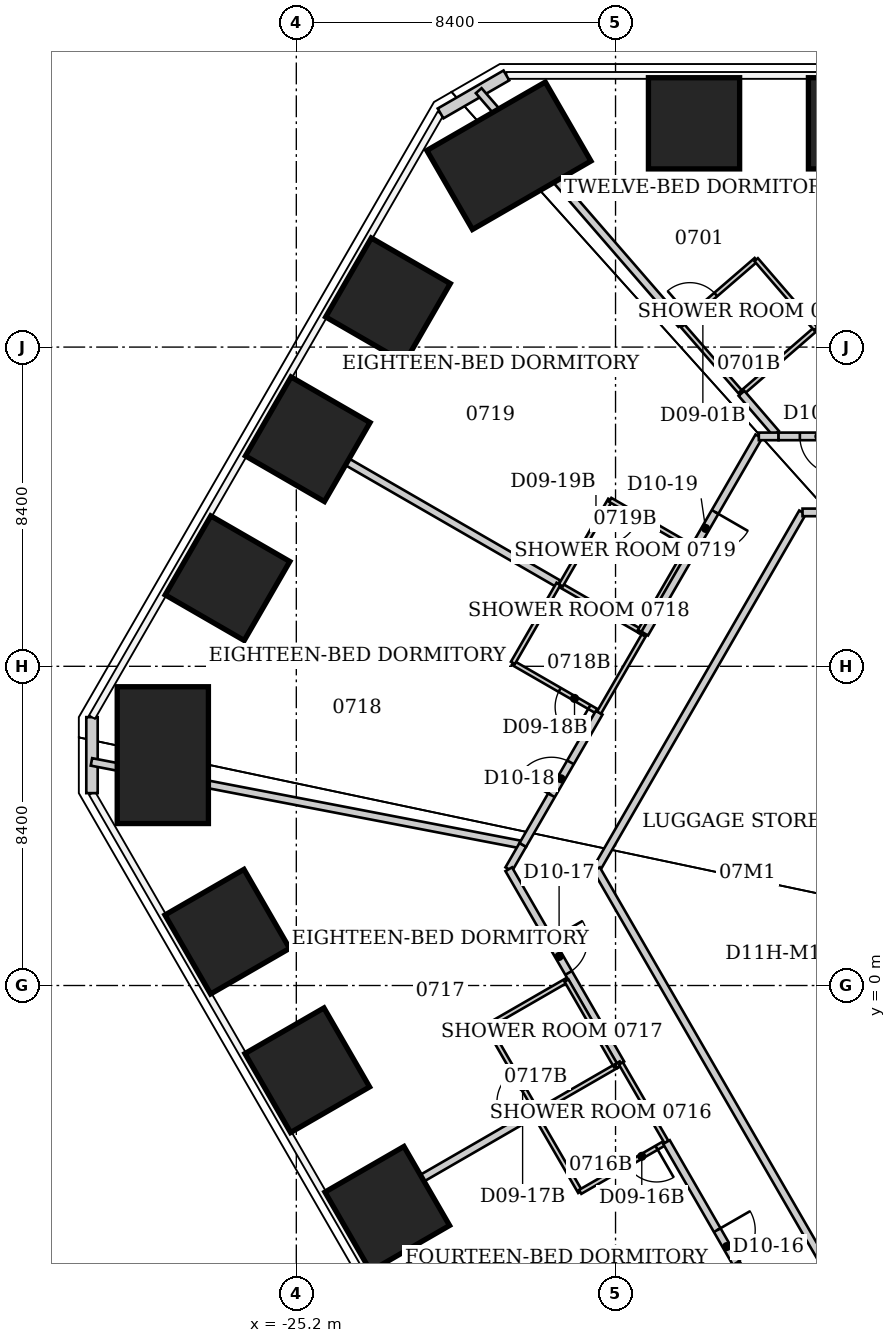
"""IFC4 building model, lengths in metres.
Left out: names, types, materials, properties, quantities, classifications, styles, units other than length and angle.
Written with IfcOpenShell. Run it as: python <this file> out.ifc"""

import sys

from ifc_helpers import new_model, si_unit, direction, frame, frame_2d, origin, origin_2d, place, context, subcontext, project, spatial, rectangle, extrude, element, fill, save


model = new_model("IFC4")
c1 = context("Model", 3, precision=1e-05, world=origin(), true_north=direction((0.0, 1.0)))
c2 = subcontext(c1, "Body", "Model", "MODEL_VIEW")
j1 = project(units=[si_unit("LENGTHUNIT", "METRE"), si_unit("PLANEANGLEUNIT", "RADIAN")], contexts=[c1])
p1 = place(None, origin())
s1 = spatial("IfcSite", under=j1, at=p1, CompositionType="ELEMENT")
p2 = place(p1, origin())
s2 = spatial("IfcBuilding", under=s1, at=p2, CompositionType="ELEMENT")
p3 = place(p2, frame((0.0, 0.0, 34.4)))
s3 = spatial("IfcBuildingStorey", under=s2, at=p3, CompositionType="ELEMENT", Elevation=34.4)
for number, where, z_axis, x_axis in (
    (1, (-14.735, 22.689, 0.0), (0.0, 0.0, 1.0), (0.0, 1.0, 0.0)),
    (2, (-10.525, 22.689, 0.0), (0.0, 0.0, 1.0), (0.0, 1.0, 0.0)),
    (3, (-22.806, -5.875, 0.0), (0.0, 0.0, 1.0), (-0.866, -0.5, 0.0)),
    (4, (-24.911, -2.23, 0.0), (0.0, 0.0, 1.0), (-0.866, -0.5, 0.0)),
    (5, (-27.016, 1.416, 0.0), (0.0, 0.0, 1.0), (-0.866, -0.5, 0.0)),
):
    element("IfcColumn", number, at=place(p3, frame(where, z_axis=z_axis, x_axis=x_axis)), inside=s3, PredefinedType="COLUMN", context=c2, shape_type="SweptSolid", body=[
        extrude(rectangle(XDim=2.4, YDim=2.4, at=origin_2d()), origin(), (0.0, 0.0, 1.0), 3.8),
    ])
p4 = place(p3, frame((-28.713, 6.062, 0.0), z_axis=(0.0, 0.0, 1.0), x_axis=(-1.0, 0.0, 0.0)))
e6 = element("IfcColumn", 6, at=p4, inside=s3, PredefinedType="COLUMN", context=c2, shape_type="SweptSolid", body=[
    extrude(rectangle(XDim=2.4, YDim=3.6, at=origin_2d()), origin(), (0.0, 0.0, 1.0), 3.8),
])
for number, where, z_axis, x_axis in (
    (7, (-27.01, 10.719, 0.0), (0.0, 0.0, 1.0), (-0.866, 0.5, 0.0)),
    (8, (-24.899, 14.375, 0.0), (0.0, 0.0, 1.0), (-0.866, 0.5, 0.0)),
    (9, (-22.788, 18.032, 0.0), (0.0, 0.0, 1.0), (-0.866, 0.5, 0.0)),
):
    element("IfcColumn", number, at=place(p3, frame(where, z_axis=z_axis, x_axis=x_axis)), inside=s3, PredefinedType="COLUMN", context=c2, shape_type="SweptSolid", body=[
        extrude(rectangle(XDim=2.4, YDim=2.4, at=origin_2d()), origin(), (0.0, 0.0, 1.0), 3.8),
    ])
p5 = place(p3, frame((-19.606, 21.835, 0.0), z_axis=(0.0, 0.0, 1.0), x_axis=(-0.5, 0.866025403784, 0.0)))
e10 = element("IfcColumn", 10, at=p5, inside=s3, PredefinedType="COLUMN", context=c2, shape_type="SweptSolid", body=[
    extrude(rectangle(XDim=2.4, YDim=3.6, at=origin_2d()), origin(), (0.0, 0.0, 1.0), 3.8),
])
for number, where, z_axis, x_axis in (
    (11, (-30.576, 5.062, 0.0), (0.0, 0.0, 1.0), (0.0, 1.0, 0.0)),
    (12, (-21.404, 22.949, 0.0), (0.0, 0.0, 1.0), (0.866, 0.5, 0.0)),
):
    element("IfcWall", number, at=place(p3, frame(where, z_axis=z_axis, x_axis=x_axis)), inside=s3, PredefinedType="SOLIDWALL", context=c2, shape_type="SweptSolid", body=[
        extrude(rectangle(XDim=2.0, YDim=0.3, at=frame_2d((1.0, 0.0))), origin(), (0.0, 0.0, 1.0), 3.64),
    ])
p6 = place(p3, frame((-30.591, 5.884, 0.0), z_axis=(0.0, 0.0, 1.0), x_axis=(0.981983289605, -0.188967772219, 0.0)))
e13 = element("IfcWall", 13, at=p6, inside=s3, PredefinedType="PARTITIONING", context=c2, shape_type="SweptSolid", body=[
    extrude(rectangle(XDim=11.509, YDim=0.2, at=frame_2d((5.754, 0.0))), origin(), (0.0, 0.0, 1.0), 3.64),
])
p7 = place(p3, frame((-25.886, 14.95, 0.0), z_axis=(0.0, 0.0, 1.0), x_axis=(0.866018495177, -0.500011965869, 0.0)))
e14 = element("IfcWall", 14, at=p7, inside=s3, PredefinedType="PARTITIONING", context=c2, shape_type="SweptSolid", body=[
    extrude(rectangle(XDim=8.76, YDim=0.2, at=frame_2d((4.38, 0.0))), origin(), (0.0, 0.0, 1.0), 2.86),
])
p8 = place(p3, frame((-23.916, -6.24, 0.0), z_axis=(0.0, 0.0, 1.0), x_axis=(0.865919350456, 0.50018364478, 0.0)))
e15 = element("IfcWall", 15, at=p8, inside=s3, PredefinedType="PARTITIONING", context=c2, shape_type="SweptSolid", body=[
    extrude(rectangle(XDim=5.758, YDim=0.2, at=frame_2d((2.879, 0.0))), origin(), (0.0, 0.0, 1.0), 3.64),
])
p9 = place(p3, frame((-20.4, 23.547, 0.0), z_axis=(0.0, 0.0, 1.0), x_axis=(0.655107582677, -0.755535608108, 0.0)))
e16 = element("IfcWall", 16, at=p9, inside=s3, PredefinedType="PARTITIONING", context=c2, shape_type="SweptSolid", body=[
    extrude(rectangle(XDim=8.136, YDim=0.2, at=frame_2d((4.068, 0.0))), origin(), (0.0, 0.0, 1.0), 3.64),
])
p10 = place(p3, frame((-20.17, -1.07, 0.0), z_axis=(0.0, 0.0, 1.0), x_axis=(0.500291685314, -0.865856933682, 0.0)))
e17 = element("IfcWall", 17, at=p10, inside=s3, PredefinedType="PARTITIONING", context=c2, shape_type="SweptSolid", body=[
    extrude(rectangle(XDim=2.599, YDim=0.12, at=frame_2d((1.299, 0.0))), origin(), (0.0, 0.0, 1.0), 3.64),
])
p11 = place(p10, frame((1.399, 0.0, 0.0)))
e18 = element("IfcOpeningElement", 18, at=p11, cuts=e17, PredefinedType="OPENING", context=c2, shape_type="SweptSolid", body=[
    extrude(rectangle(XDim=0.9, YDim=2.03, at=frame_2d((0.45, 1.015))), frame((0.0, 0.06, 0.0), z_axis=(0.0, -1.0, 0.0), x_axis=(1.0, 0.0, 0.0)), (0.0, 0.0, 1.0), 0.12),
])
p12 = place(p3, frame((-19.61, 3.06, 0.0), z_axis=(0.0, 0.0, 1.0), x_axis=(0.50068472101, 0.865629718844, 0.0)))
e19 = element("IfcWall", 19, at=p12, inside=s3, PredefinedType="PARTITIONING", context=c2, shape_type="SweptSolid", body=[
    extrude(rectangle(XDim=0.739, YDim=0.2, at=frame_2d((0.37, 0.0))), origin(), (0.0, 0.0, 1.0), 3.64),
])
p13 = place(p3, frame((-19.61, 3.06, 0.0), z_axis=(0.0, 0.0, 1.0), x_axis=(0.499983910424, -0.866034692906, 0.0)))
e20 = element("IfcWall", 20, at=p13, inside=s3, PredefinedType="PARTITIONING", context=c2, shape_type="SweptSolid", body=[
    extrude(rectangle(XDim=5.901, YDim=0.2, at=frame_2d((2.95, 0.0))), origin(), (0.0, 0.0, 1.0), 3.64),
])
p14 = place(p13, frame((2.15, 0.0, 0.0)))
e21 = element("IfcOpeningElement", 21, at=p14, cuts=e20, PredefinedType="OPENING", context=c2, shape_type="SweptSolid", body=[
    extrude(rectangle(XDim=1.0, YDim=2.13, at=frame_2d((0.5, 1.065))), frame((0.0, 0.1, 0.0), z_axis=(0.0, -1.0, 0.0), x_axis=(1.0, 0.0, 0.0)), (0.0, 0.0, 1.0), 0.2),
])
p15 = place(p3, frame((-19.5, 8.49, 0.0), z_axis=(0.0, 0.0, 1.0), x_axis=(0.866114241029, -0.499846097802, 0.0)))
e22 = element("IfcWall", 22, at=p15, inside=s3, PredefinedType="PARTITIONING", context=c2, shape_type="SweptSolid", body=[
    extrude(rectangle(XDim=2.621, YDim=0.12, at=frame_2d((1.311, 0.0))), origin(), (0.0, 0.0, 1.0), 3.64),
])
p16 = place(p15, frame((1.421, 0.0, 0.0)))
e23 = element("IfcOpeningElement", 23, at=p16, cuts=e22, PredefinedType="OPENING", context=c2, shape_type="SweptSolid", body=[
    extrude(rectangle(XDim=0.9, YDim=2.03, at=frame_2d((0.45, 1.015))), frame((0.0, 0.06, 0.0), z_axis=(0.0, -1.0, 0.0), x_axis=(1.0, 0.0, 0.0)), (0.0, 0.0, 1.0), 0.12),
])
p17 = place(p3, frame((-19.24, 3.7, 0.0), z_axis=(0.0, 0.0, 1.0), x_axis=(0.500157149565, 0.865934654428, 0.0)))
e24 = element("IfcWall", 24, at=p17, inside=s3, PredefinedType="PARTITIONING", context=c2, shape_type="SweptSolid", body=[
    extrude(rectangle(XDim=4.019, YDim=0.2, at=frame_2d((2.009, 0.0))), origin(), (0.0, 0.0, 1.0), 3.64),
])
p18 = place(p17, frame((1.51, 0.0, 0.0)))
e25 = element("IfcOpeningElement", 25, at=p18, cuts=e24, PredefinedType="OPENING", context=c2, shape_type="SweptSolid", body=[
    extrude(rectangle(XDim=1.0, YDim=2.13, at=frame_2d((0.5, 1.065))), frame((0.0, 0.1, 0.0), z_axis=(0.0, -1.0, 0.0), x_axis=(1.0, 0.0, 0.0)), (0.0, 0.0, 1.0), 0.2),
])
p19 = place(p3, frame((-18.93, -3.36, 0.0), z_axis=(0.0, 0.0, 1.0), x_axis=(0.501547039172, -0.865130376012, 0.0)))
e26 = element("IfcWall", 26, at=p19, inside=s3, PredefinedType="PARTITIONING", context=c2, shape_type="SweptSolid", body=[
    extrude(rectangle(XDim=2.393, YDim=0.12, at=frame_2d((1.196, 0.0))), origin(), (0.0, 0.0, 1.0), 3.64),
])
for number, where, z_axis, x_axis in (
    (27, (-18.868, -3.324, 0.0), (0.0, 0.0, 1.0), (0.866, 0.5, 0.0)),
    (28, (-18.3, 10.57, 0.0), (0.0, 0.0, 1.0), (-0.5, -0.866, 0.0)),
):
    element("IfcWall", number, at=place(p3, frame(where, z_axis=z_axis, x_axis=x_axis)), inside=s3, PredefinedType="PARTITIONING", context=c2, shape_type="SweptSolid", body=[
        extrude(rectangle(XDim=2.401, YDim=0.12, at=frame_2d((1.201, 0.0))), origin(), (0.0, 0.0, 1.0), 3.64),
    ])
p20 = place(p3, frame((-18.24, 10.53, 0.0), z_axis=(0.0, 0.0, 1.0), x_axis=(0.866202511239, -0.499693115345, 0.0)))
e29 = element("IfcWall", 29, at=p20, inside=s3, PredefinedType="PARTITIONING", context=c2, shape_type="SweptSolid", body=[
    extrude(rectangle(XDim=2.401, YDim=0.12, at=frame_2d((1.201, 0.0))), origin(), (0.0, 0.0, 1.0), 2.86),
])
p21 = place(p3, frame((-18.09, 0.13, 0.0), z_axis=(0.0, 0.0, 1.0), x_axis=(-0.866177122335, -0.499737123639, 0.0)))
e30 = element("IfcWall", 30, at=p21, inside=s3, PredefinedType="PARTITIONING", context=c2, shape_type="SweptSolid", body=[
    extrude(rectangle(XDim=2.401, YDim=0.12, at=frame_2d((1.201, 0.0))), origin(), (0.0, 0.0, 1.0), 3.64),
])
p22 = place(p3, frame((-17.73, -5.43, 0.0), z_axis=(0.0, 0.0, 1.0), x_axis=(0.866114241029, 0.499846097802, 0.0)))
e31 = element("IfcWall", 31, at=p22, inside=s3, PredefinedType="PARTITIONING", context=c2, shape_type="SweptSolid", body=[
    extrude(rectangle(XDim=2.621, YDim=0.12, at=frame_2d((1.311, 0.0))), origin(), (0.0, 0.0, 1.0), 2.878),
])
p23 = place(p22, frame((1.421, 0.0, 0.0)))
e32 = element("IfcOpeningElement", 32, at=p23, cuts=e31, PredefinedType="OPENING", context=c2, shape_type="SweptSolid", body=[
    extrude(rectangle(XDim=0.9, YDim=2.03, at=frame_2d((0.45, 1.015))), frame((0.0, 0.06, 0.0), z_axis=(0.0, -1.0, 0.0), x_axis=(1.0, 0.0, 0.0)), (0.0, 0.0, 1.0), 0.12),
])
p24 = place(p3, frame((-17.3, 3.06, 0.0), z_axis=(0.0, 0.0, 1.0), x_axis=(0.499924528042, 0.866068973155, 0.0)))
e33 = element("IfcWall", 33, at=p24, inside=s3, PredefinedType="PARTITIONING", context=c2, shape_type="SweptSolid", body=[
    extrude(rectangle(XDim=10.842, YDim=0.2, at=frame_2d((5.421, 0.0))), origin(), (0.0, 0.0, 1.0), 3.64),
])
p25 = place(p3, frame((-17.234, 7.182, 0.0), z_axis=(0.0, 0.0, 1.0), x_axis=(0.500719628902, 0.865609526999, 0.0)))
e34 = element("IfcWall", 34, at=p25, inside=s3, PredefinedType="PARTITIONING", context=c2, shape_type="SweptSolid", body=[
    extrude(rectangle(XDim=2.401, YDim=0.12, at=frame_2d((1.201, 0.0))), origin(), (0.0, 0.0, 1.0), 3.64),
])
p26 = place(p3, frame((-16.94, 12.78, 0.0), z_axis=(0.0, 0.0, 1.0), x_axis=(-0.500291685314, -0.865856933682, 0.0)))
e35 = element("IfcWall", 35, at=p26, inside=s3, PredefinedType="PARTITIONING", context=c2, shape_type="SweptSolid", body=[
    extrude(rectangle(XDim=2.599, YDim=0.12, at=frame_2d((1.299, 0.0))), origin(), (0.0, 0.0, 1.0), 3.64),
])
p27 = place(p26, frame((0.3, 0.0, 0.0)))
e36 = element("IfcOpeningElement", 36, at=p27, cuts=e35, PredefinedType="OPENING", context=c2, shape_type="SweptSolid", body=[
    extrude(rectangle(XDim=0.9, YDim=2.03, at=frame_2d((0.45, 1.015))), frame((0.0, 0.06, 0.0), z_axis=(0.0, -1.0, 0.0), x_axis=(1.0, 0.0, 0.0)), (0.0, 0.0, 1.0), 0.12),
])
p28 = place(p3, frame((-16.79, -2.12, 0.0), z_axis=(0.0, 0.0, 1.0), x_axis=(-0.50025099007, 0.865880446098, 0.0)))
e37 = element("IfcWall", 37, at=p28, inside=s3, PredefinedType="PARTITIONING", context=c2, shape_type="SweptSolid", body=[
    extrude(rectangle(XDim=2.599, YDim=0.12, at=frame_2d((1.299, 0.0))), origin(), (0.0, 0.0, 1.0), 3.64),
])
p29 = place(p3, frame((-16.788, -2.124, 0.0), z_axis=(0.0, 0.0, 1.0), x_axis=(0.866405716731, 0.499340699338, 0.0)))
e38 = element("IfcWall", 38, at=p29, inside=s3, PredefinedType="PARTITIONING", context=c2, shape_type="SweptSolid", body=[
    extrude(rectangle(XDim=0.148, YDim=0.12, at=frame_2d((0.074, 0.0))), origin(), (0.0, 0.0, 1.0), 3.64),
])
p30 = place(p3, frame((-16.66, -2.05, 0.0), z_axis=(0.0, 0.0, 1.0), x_axis=(0.501502765098, -0.865156041763, 0.0)))
e39 = element("IfcWall", 39, at=p30, inside=s3, PredefinedType="PARTITIONING", context=c2, shape_type="SweptSolid", body=[
    extrude(rectangle(XDim=2.393, YDim=0.12, at=frame_2d((1.196, 0.0))), origin(), (0.0, 0.0, 1.0), 3.64),
])
p31 = place(p3, frame((-16.16, 9.33, 0.0), z_axis=(0.0, 0.0, 1.0), x_axis=(0.880098986228, -0.47479024257, 0.0)))
e40 = element("IfcWall", 40, at=p31, inside=s3, PredefinedType="PARTITIONING", context=c2, shape_type="SweptSolid", body=[
    extrude(rectangle(XDim=0.147, YDim=0.12, at=frame_2d((0.074, 0.0))), origin(), (0.0, 0.0, 1.0), 3.64),
])
p32 = place(p3, frame((-16.16, 9.33, 0.0), z_axis=(0.0, 0.0, 1.0), x_axis=(0.500291685314, 0.865856933682, 0.0)))
e41 = element("IfcWall", 41, at=p32, inside=s3, PredefinedType="PARTITIONING", context=c2, shape_type="SweptSolid", body=[
    extrude(rectangle(XDim=2.599, YDim=0.12, at=frame_2d((1.299, 0.0))), origin(), (0.0, 0.0, 1.0), 3.64),
])
p33 = place(p3, frame((-16.031, 9.261, 0.0), z_axis=(0.0, 0.0, 1.0), x_axis=(0.500702302597, 0.865619549325, 0.0)))
e42 = element("IfcWall", 42, at=p33, inside=s3, PredefinedType="PARTITIONING", context=c2, shape_type="SweptSolid", body=[
    extrude(rectangle(XDim=5.995, YDim=0.2, at=frame_2d((2.997, 0.0))), origin(), (0.0, 0.0, 1.0), 3.64),
])
p34 = place(p33, frame((2.697, 0.0, 0.0)))
e43 = element("IfcOpeningElement", 43, at=p34, cuts=e42, PredefinedType="OPENING", context=c2, shape_type="SweptSolid", body=[
    extrude(rectangle(XDim=1.0, YDim=2.13, at=frame_2d((0.5, 1.065))), frame((0.0, 0.1, 0.0), z_axis=(0.0, -1.0, 0.0), x_axis=(1.0, 0.0, 0.0)), (0.0, 0.0, 1.0), 0.2),
])
p35 = place(p3, frame((-15.46, -4.12, 0.0), z_axis=(0.0, 0.0, 1.0), x_axis=(0.499349514416, -0.866400636226, 0.0)))
e44 = element("IfcWall", 44, at=p35, inside=s3, PredefinedType="PARTITIONING", context=c2, shape_type="SweptSolid", body=[
    extrude(rectangle(XDim=6.348, YDim=0.2, at=frame_2d((3.174, 0.0))), origin(), (0.0, 0.0, 1.0), 3.64),
])
p36 = place(p35, frame((2.674, 0.0, 0.0)))
e45 = element("IfcOpeningElement", 45, at=p36, cuts=e44, PredefinedType="OPENING", context=c2, shape_type="SweptSolid", body=[
    extrude(rectangle(XDim=1.0, YDim=2.13, at=frame_2d((0.5, 1.065))), frame((0.0, 0.1, 0.0), z_axis=(0.0, -1.0, 0.0), x_axis=(1.0, 0.0, 0.0)), (0.0, 0.0, 1.0), 0.2),
])
p37 = place(p3, frame((-15.07, 17.4, 0.0), z_axis=(0.0, 0.0, 1.0), x_axis=(0.657083550002, -0.753817755374, 0.0)))
e46 = element("IfcWall", 46, at=p37, inside=s3, PredefinedType="PARTITIONING", context=c2, shape_type="SweptSolid", body=[
    extrude(rectangle(XDim=2.41, YDim=0.12, at=frame_2d((1.205, 0.0))), origin(), (0.0, 0.0, 1.0), 3.64),
])
p38 = place(p3, frame((-14.86, 11.58, 0.0), z_axis=(0.0, 0.0, 1.0), x_axis=(-0.866177122335, 0.499737123639, 0.0)))
e47 = element("IfcWall", 47, at=p38, inside=s3, PredefinedType="PARTITIONING", context=c2, shape_type="SweptSolid", body=[
    extrude(rectangle(XDim=2.401, YDim=0.12, at=frame_2d((1.201, 0.0))), origin(), (0.0, 0.0, 1.0), 3.64),
])
p39 = place(p3, frame((-13.49, 15.58, 0.0), z_axis=(0.0, 0.0, 1.0), x_axis=(0.755437535555, 0.655220672655, 0.0)))
e48 = element("IfcWall", 48, at=p39, inside=s3, PredefinedType="PARTITIONING", context=c2, shape_type="SweptSolid", body=[
    extrude(rectangle(XDim=2.594, YDim=0.12, at=frame_2d((1.297, 0.0))), origin(), (0.0, 0.0, 1.0), 3.64),
])
p40 = place(p3, frame((-13.486, 15.583, 0.0), z_axis=(0.0, 0.0, 1.0), x_axis=(0.652755533609, -0.75756861956, 0.0)))
e49 = element("IfcWall", 49, at=p40, inside=s3, PredefinedType="PARTITIONING", context=c2, shape_type="SweptSolid", body=[
    extrude(rectangle(XDim=1.391, YDim=0.2, at=frame_2d((0.695, 0.0))), origin(), (0.0, 0.0, 1.0), 3.64),
])
p41 = place(p3, frame((-13.1, 19.1, 0.0), z_axis=(0.0, 0.0, 1.0), x_axis=(-0.757040252764, -0.65336823897, 0.0)))
e50 = element("IfcWall", 50, at=p41, inside=s3, PredefinedType="PARTITIONING", context=c2, shape_type="SweptSolid", body=[
    extrude(rectangle(XDim=2.602, YDim=0.12, at=frame_2d((1.301, 0.0))), origin(), (0.0, 0.0, 1.0), 3.64),
])
p42 = place(p41, frame((1.402, 0.0, 0.0)))
e51 = element("IfcOpeningElement", 51, at=p42, cuts=e50, PredefinedType="OPENING", context=c2, shape_type="SweptSolid", body=[
    extrude(rectangle(XDim=0.9, YDim=2.03, at=frame_2d((0.45, 1.015))), frame((0.0, 0.06, 0.0), z_axis=(0.0, -1.0, 0.0), x_axis=(1.0, 0.0, 0.0)), (0.0, 0.0, 1.0), 0.12),
])
p43 = place(p3, frame((-12.51, 14.45, 0.0), z_axis=(0.0, 0.0, 1.0), x_axis=(-1.0, 0.0, 0.0)))
e52 = element("IfcWall", 52, at=p43, inside=s3, PredefinedType="PARTITIONING", context=c2, shape_type="SweptSolid", body=[
    extrude(rectangle(XDim=0.52, YDim=0.2, at=frame_2d((0.26, 0.0))), origin(), (0.0, 0.0, 1.0), 3.64),
])
p44 = place(p3, frame((-11.88, 12.45, 0.0), z_axis=(0.0, 0.0, 1.0), x_axis=(1.0, 0.0, 0.0)))
e53 = element("IfcWall", 53, at=p44, inside=s3, PredefinedType="PARTITIONING", context=c2, shape_type="SweptSolid", body=[
    extrude(rectangle(XDim=11.73, YDim=0.2, at=frame_2d((5.865, 0.0))), origin(), (0.0, 0.0, 1.0), 3.64),
])
p45 = place(p3, frame((-11.53, 17.28, 0.0), z_axis=(0.0, 0.0, 1.0), x_axis=(-0.653188728136, 0.757195143563, 0.0)))
e54 = element("IfcWall", 54, at=p45, inside=s3, PredefinedType="PARTITIONING", context=c2, shape_type="SweptSolid", body=[
    extrude(rectangle(XDim=2.404, YDim=0.12, at=frame_2d((1.202, 0.0))), origin(), (0.0, 0.0, 1.0), 3.64),
])
p46 = place(p3, frame((-11.16, -7.57, 0.0), z_axis=(0.0, 0.0, 1.0), x_axis=(-0.500175206663, 0.865924224537, 0.0)))
e55 = element("IfcWall", 55, at=p46, inside=s3, PredefinedType="PARTITIONING", context=c2, shape_type="SweptSolid", body=[
    extrude(rectangle(XDim=12.275, YDim=0.2, at=frame_2d((6.138, 0.0))), origin(), (0.0, 0.0, 1.0), 3.64),
])
p47 = place(p3, frame((-10.39, 14.45, 0.0), z_axis=(0.0, 0.0, 1.0), x_axis=(-1.0, 0.0, 0.0)))
e56 = element("IfcWall", 56, at=p47, inside=s3, PredefinedType="PARTITIONING", context=c2, shape_type="SweptSolid", body=[
    extrude(rectangle(XDim=2.12, YDim=0.2, at=frame_2d((1.06, 0.0))), origin(), (0.0, 0.0, 1.0), 3.64),
])
p48 = place(p47, frame((0.56, 0.0, 0.0)))
e57 = element("IfcOpeningElement", 57, at=p48, cuts=e56, PredefinedType="OPENING", context=c2, shape_type="SweptSolid", body=[
    extrude(rectangle(XDim=1.0, YDim=2.13, at=frame_2d((0.5, 1.065))), frame((0.0, 0.1, 0.0), z_axis=(0.0, -1.0, 0.0), x_axis=(1.0, 0.0, 0.0)), (0.0, 0.0, 1.0), 0.2),
])
p49 = place(p48, origin())
e58 = element("IfcDoor", 58, at=p49, inside=s3, OperationType="SINGLE_SWING_LEFT", PredefinedType="DOOR", context=c2, shape_type="SweptSolid", body=[
    extrude(rectangle(XDim=1.0, YDim=2.13, at=frame_2d((0.5, 1.065))), frame((0.0, 0.025, 0.0), z_axis=(0.0, -1.0, 0.0), x_axis=(1.0, 0.0, 0.0)), (0.0, 0.0, 1.0), 0.05),
])
fill(e57, e58)
p50 = place(p42, origin())
e59 = element("IfcDoor", 59, at=p50, inside=s3, OperationType="SINGLE_SWING_RIGHT", PredefinedType="DOOR", context=c2, shape_type="SweptSolid", body=[
    extrude(rectangle(XDim=0.9, YDim=2.03, at=frame_2d((0.45, 1.015))), frame((0.0, 0.025, 0.0), z_axis=(0.0, -1.0, 0.0), x_axis=(1.0, 0.0, 0.0)), (0.0, 0.0, 1.0), 0.05),
])
fill(e51, e59)
p51 = place(p36, origin())
e60 = element("IfcDoor", 60, at=p51, inside=s3, OperationType="SINGLE_SWING_LEFT", PredefinedType="DOOR", context=c2, shape_type="SweptSolid", body=[
    extrude(rectangle(XDim=1.0, YDim=2.13, at=frame_2d((0.5, 1.065))), frame((0.0, 0.025, 0.0), z_axis=(0.0, -1.0, 0.0), x_axis=(1.0, 0.0, 0.0)), (0.0, 0.0, 1.0), 0.05),
])
fill(e45, e60)
p52 = place(p23, origin())
e61 = element("IfcDoor", 61, at=p52, inside=s3, OperationType="SINGLE_SWING_RIGHT", PredefinedType="DOOR", context=c2, shape_type="SweptSolid", body=[
    extrude(rectangle(XDim=0.9, YDim=2.03, at=frame_2d((0.45, 1.015))), frame((0.0, 0.025, 0.0), z_axis=(0.0, -1.0, 0.0), x_axis=(1.0, 0.0, 0.0)), (0.0, 0.0, 1.0), 0.05),
])
fill(e32, e61)
p53 = place(p14, origin())
e62 = element("IfcDoor", 62, at=p53, inside=s3, OperationType="SINGLE_SWING_LEFT", PredefinedType="DOOR", context=c2, shape_type="SweptSolid", body=[
    extrude(rectangle(XDim=1.0, YDim=2.13, at=frame_2d((0.5, 1.065))), frame((0.0, 0.025, 0.0), z_axis=(0.0, -1.0, 0.0), x_axis=(1.0, 0.0, 0.0)), (0.0, 0.0, 1.0), 0.05),
])
fill(e21, e62)
p54 = place(p11, origin())
e63 = element("IfcDoor", 63, at=p54, inside=s3, OperationType="SINGLE_SWING_RIGHT", PredefinedType="DOOR", context=c2, shape_type="SweptSolid", body=[
    extrude(rectangle(XDim=0.9, YDim=2.03, at=frame_2d((0.45, 1.015))), frame((0.0, 0.025, 0.0), z_axis=(0.0, -1.0, 0.0), x_axis=(1.0, 0.0, 0.0)), (0.0, 0.0, 1.0), 0.05),
])
fill(e18, e63)
p55 = place(p18, origin())
e64 = element("IfcDoor", 64, at=p55, inside=s3, OperationType="SINGLE_SWING_LEFT", PredefinedType="DOOR", context=c2, shape_type="SweptSolid", body=[
    extrude(rectangle(XDim=1.0, YDim=2.13, at=frame_2d((0.5, 1.065))), frame((0.0, 0.025, 0.0), z_axis=(0.0, -1.0, 0.0), x_axis=(1.0, 0.0, 0.0)), (0.0, 0.0, 1.0), 0.05),
])
fill(e25, e64)
p56 = place(p16, origin())
e65 = element("IfcDoor", 65, at=p56, inside=s3, OperationType="SINGLE_SWING_RIGHT", PredefinedType="DOOR", context=c2, shape_type="SweptSolid", body=[
    extrude(rectangle(XDim=0.9, YDim=2.03, at=frame_2d((0.45, 1.015))), frame((0.0, 0.025, 0.0), z_axis=(0.0, -1.0, 0.0), x_axis=(1.0, 0.0, 0.0)), (0.0, 0.0, 1.0), 0.05),
])
fill(e23, e65)
p57 = place(p34, origin())
e66 = element("IfcDoor", 66, at=p57, inside=s3, OperationType="SINGLE_SWING_RIGHT", PredefinedType="DOOR", context=c2, shape_type="SweptSolid", body=[
    extrude(rectangle(XDim=1.0, YDim=2.13, at=frame_2d((0.5, 1.065))), frame((0.0, 0.025, 0.0), z_axis=(0.0, -1.0, 0.0), x_axis=(1.0, 0.0, 0.0)), (0.0, 0.0, 1.0), 0.05),
])
fill(e43, e66)
p58 = place(p27, origin())
e67 = element("IfcDoor", 67, at=p58, inside=s3, OperationType="SINGLE_SWING_LEFT", PredefinedType="DOOR", context=c2, shape_type="SweptSolid", body=[
    extrude(rectangle(XDim=0.9, YDim=2.03, at=frame_2d((0.45, 1.015))), frame((0.0, 0.025, 0.0), z_axis=(0.0, -1.0, 0.0), x_axis=(1.0, 0.0, 0.0)), (0.0, 0.0, 1.0), 0.05),
])
fill(e36, e67)
save(model, sys.argv[1])
